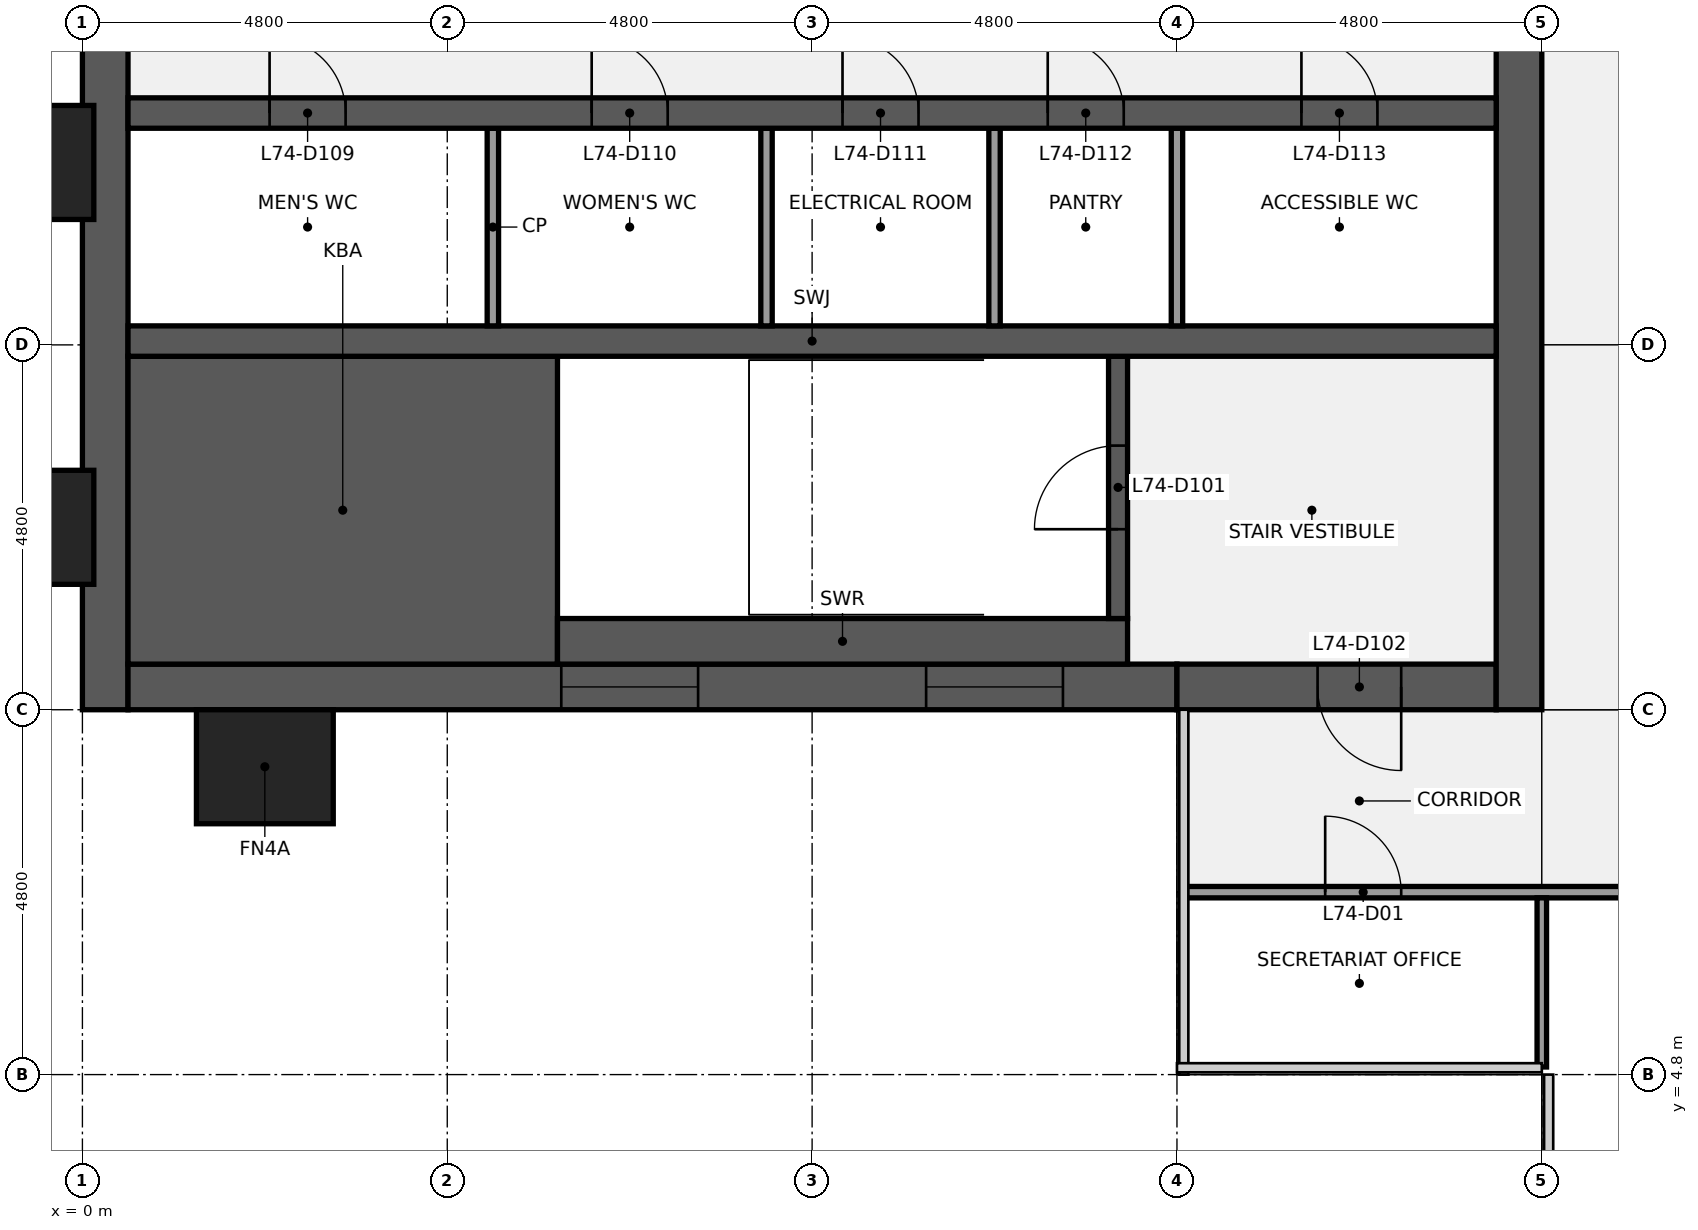
"""IFC4 building model, lengths in metres.
Left out: names, types, materials, properties, quantities, classifications, styles, units other than length and angle.
Written with IfcOpenShell. Run it as: python <this file> out.ifc"""

import sys

from ifc_helpers import new_model, si_unit, direction, frame, frame_2d, origin, origin_2d, place, context, subcontext, project, spatial, rectangle, extrude, element, fill, save


model = new_model("IFC4")
c1 = context("Model", 3, precision=1e-05, world=origin(), true_north=direction((0.0, 1.0)))
c2 = subcontext(c1, "Body", "Model", "MODEL_VIEW")
j1 = project(units=[si_unit("LENGTHUNIT", "METRE"), si_unit("PLANEANGLEUNIT", "RADIAN")], contexts=[c1])
p1 = place(None, origin())
s1 = spatial("IfcSite", under=j1, at=p1, CompositionType="ELEMENT")
p2 = place(p1, origin())
s2 = spatial("IfcBuilding", under=s1, at=p2, CompositionType="ELEMENT")
p3 = place(p2, frame((0.0, 0.0, 334.3)))
s3 = spatial("IfcBuildingStorey", under=s2, at=p3, CompositionType="ELEMENT", Elevation=334.3)
p4 = place(p3, frame((0.3, 9.6, 0.0), z_axis=(0.0, 0.0, 1.0), x_axis=(0.0, 1.0, 0.0)))
e1 = element("IfcWall", 1, at=p4, inside=s3, PredefinedType="SHEAR", context=c2, shape_type="SweptSolid", body=[
    extrude(rectangle(XDim=28.8, YDim=0.6, at=frame_2d((14.4, 0.0))), origin(), (0.0, 0.0, 1.0), 3.84),
])
p5 = place(p4, frame((8.85, 0.0, 0.9)))
e2 = element("IfcOpeningElement", 2, at=p5, cuts=e1, PredefinedType="OPENING", context=c2, shape_type="SweptSolid", body=[
    extrude(rectangle(XDim=1.5, YDim=1.5, at=frame_2d((0.75, 0.75))), frame((0.0, 0.31, 0.0), z_axis=(0.0, -1.0, 0.0), x_axis=(1.0, 0.0, 0.0)), (0.0, 0.0, 1.0), 0.62),
])
p6 = place(p4, frame((18.45, 0.0, 0.9)))
e3 = element("IfcOpeningElement", 3, at=p6, cuts=e1, PredefinedType="OPENING", context=c2, shape_type="SweptSolid", body=[
    extrude(rectangle(XDim=1.5, YDim=1.5, at=frame_2d((0.75, 0.75))), frame((0.0, 0.31, 0.0), z_axis=(0.0, -1.0, 0.0), x_axis=(1.0, 0.0, 0.0)), (0.0, 0.0, 1.0), 0.62),
])
p7 = place(p3, frame((14.4, 9.9, 0.0), z_axis=(0.0, 0.0, 1.0), x_axis=(-1.0, 0.0, 0.0)))
e4 = element("IfcWall", 4, at=p7, inside=s3, PredefinedType="SHEAR", context=c2, shape_type="SweptSolid", body=[
    extrude(rectangle(XDim=13.8, YDim=0.6, at=frame_2d((6.9, 0.0))), origin(), (0.0, 0.0, 1.0), 3.84),
])
p8 = place(p7, frame((6.3, 0.0, 0.9)))
e5 = element("IfcOpeningElement", 5, at=p8, cuts=e4, PredefinedType="OPENING", context=c2, shape_type="SweptSolid", body=[
    extrude(rectangle(XDim=1.8, YDim=1.5, at=frame_2d((0.9, 0.75))), frame((0.0, 0.31, 0.0), z_axis=(0.0, -1.0, 0.0), x_axis=(1.0, 0.0, 0.0)), (0.0, 0.0, 1.0), 0.62),
])
p9 = place(p7, frame((1.5, 0.0, 0.9)))
e6 = element("IfcOpeningElement", 6, at=p9, cuts=e4, PredefinedType="OPENING", context=c2, shape_type="SweptSolid", body=[
    extrude(rectangle(XDim=1.8, YDim=1.5, at=frame_2d((0.9, 0.75))), frame((0.0, 0.31, 0.0), z_axis=(0.0, -1.0, 0.0), x_axis=(1.0, 0.0, 0.0)), (0.0, 0.0, 1.0), 0.62),
])
p10 = place(p3, frame((18.6, 9.9, 0.0), z_axis=(0.0, 0.0, 1.0), x_axis=(-1.0, 0.0, 0.0)))
e7 = element("IfcWall", 7, at=p10, inside=s3, PredefinedType="SHEAR", context=c2, shape_type="SweptSolid", body=[
    extrude(rectangle(XDim=4.2, YDim=0.6, at=frame_2d((2.1, 0.0))), origin(), (0.0, 0.0, 1.0), 3.84),
])
p11 = place(p10, frame((1.25, 0.0, 0.0)))
e8 = element("IfcOpeningElement", 8, at=p11, cuts=e7, PredefinedType="OPENING", context=c2, shape_type="SweptSolid", body=[
    extrude(rectangle(XDim=1.1, YDim=2.1, at=frame_2d((0.55, 1.05))), frame((0.0, 0.31, 0.0), z_axis=(0.0, -1.0, 0.0), x_axis=(1.0, 0.0, 0.0)), (0.0, 0.0, 1.0), 0.62),
])
p12 = place(p3, frame((18.9, 38.4, 0.0), z_axis=(0.0, 0.0, 1.0), x_axis=(0.0, -1.0, 0.0)))
e9 = element("IfcWall", 9, at=p12, inside=s3, PredefinedType="SHEAR", context=c2, shape_type="SweptSolid", body=[
    extrude(rectangle(XDim=28.8, YDim=0.6, at=frame_2d((14.4, 0.0))), origin(), (0.0, 0.0, 1.0), 3.84),
])
p13 = place(p12, frame((18.3, 0.0, 0.0)))
e10 = element("IfcOpeningElement", 10, at=p13, cuts=e9, PredefinedType="OPENING", context=c2, shape_type="SweptSolid", body=[
    extrude(rectangle(XDim=1.8, YDim=2.1, at=frame_2d((0.9, 1.05))), frame((0.0, 0.31, 0.0), z_axis=(0.0, -1.0, 0.0), x_axis=(1.0, 0.0, 0.0)), (0.0, 0.0, 1.0), 0.62),
])
p14 = place(p12, frame((8.7, 0.0, 0.0)))
e11 = element("IfcOpeningElement", 11, at=p14, cuts=e9, PredefinedType="OPENING", context=c2, shape_type="SweptSolid", body=[
    extrude(rectangle(XDim=1.8, YDim=2.1, at=frame_2d((0.9, 1.05))), frame((0.0, 0.31, 0.0), z_axis=(0.0, -1.0, 0.0), x_axis=(1.0, 0.0, 0.0)), (0.0, 0.0, 1.0), 0.62),
])
p15 = place(p3, frame((0.6, 12.225, 0.0), z_axis=(0.0, 0.0, 1.0), x_axis=(1.0, 0.0, 0.0)))
e12 = element("IfcWall", 12, at=p15, inside=s3, PredefinedType="SHEAR", context=c2, shape_type="SweptSolid", body=[
    extrude(rectangle(XDim=5.65, YDim=4.05, at=frame_2d((2.825, 0.0))), origin(), (0.0, 0.0, 1.0), 3.84),
])
p16 = place(p3, frame((6.25, 10.5, 0.0), z_axis=(0.0, 0.0, 1.0), x_axis=(1.0, 0.0, 0.0)))
e13 = element("IfcWall", 13, at=p16, inside=s3, PredefinedType="SHEAR", context=c2, shape_type="SweptSolid", body=[
    extrude(rectangle(XDim=7.5, YDim=0.6, at=frame_2d((3.75, 0.0))), origin(), (0.0, 0.0, 1.0), 3.84),
])
p17 = place(p3, frame((13.625, 10.8, 0.0), z_axis=(0.0, 0.0, 1.0), x_axis=(0.0, 1.0, 0.0)))
e14 = element("IfcWall", 14, at=p17, inside=s3, PredefinedType="SHEAR", context=c2, shape_type="SweptSolid", body=[
    extrude(rectangle(XDim=3.45, YDim=0.25, at=frame_2d((1.725, 0.0))), origin(), (0.0, 0.0, 1.0), 3.84),
])
p18 = place(p17, frame((1.175, 0.0, 0.0)))
e15 = element("IfcOpeningElement", 15, at=p18, cuts=e14, PredefinedType="OPENING", context=c2, shape_type="SweptSolid", body=[
    extrude(rectangle(XDim=1.1, YDim=2.1, at=frame_2d((0.55, 1.05))), frame((0.0, 0.135, 0.0), z_axis=(0.0, -1.0, 0.0), x_axis=(1.0, 0.0, 0.0)), (0.0, 0.0, 1.0), 0.27),
])
p19 = place(p3, frame((0.6, 14.45, 0.0), z_axis=(0.0, 0.0, 1.0), x_axis=(1.0, 0.0, 0.0)))
e16 = element("IfcWall", 16, at=p19, inside=s3, PredefinedType="SHEAR", context=c2, shape_type="SweptSolid", body=[
    extrude(rectangle(XDim=18.0, YDim=0.4, at=frame_2d((9.0, 0.0))), origin(), (0.0, 0.0, 1.0), 3.84),
])
for number, where, z_axis, x_axis in (
    (17, (5.4, 14.65, 0.0), (0.0, 0.0, 1.0), (0.0, 1.0, 0.0)),
    (18, (9.0, 14.65, 0.0), (0.0, 0.0, 1.0), (0.0, 1.0, 0.0)),
    (19, (12.0, 14.65, 0.0), (0.0, 0.0, 1.0), (0.0, 1.0, 0.0)),
    (20, (14.4, 14.65, 0.0), (0.0, 0.0, 1.0), (0.0, 1.0, 0.0)),
):
    element("IfcWall", number, at=place(p3, frame(where, z_axis=z_axis, x_axis=x_axis)), inside=s3, PredefinedType="PARTITIONING", context=c2, shape_type="SweptSolid", body=[
        extrude(rectangle(XDim=2.6, YDim=0.15, at=frame_2d((1.3, 0.0))), origin(), (0.0, 0.0, 1.0), 3.84),
    ])
p20 = place(p3, frame((0.6, 17.45, 0.0), z_axis=(0.0, 0.0, 1.0), x_axis=(1.0, 0.0, 0.0)))
e21 = element("IfcWall", 21, at=p20, inside=s3, PredefinedType="SHEAR", context=c2, shape_type="SweptSolid", body=[
    extrude(rectangle(XDim=18.0, YDim=0.4, at=frame_2d((9.0, 0.0))), origin(), (0.0, 0.0, 1.0), 3.84),
])
p21 = place(p20, frame((1.863, 0.0, 0.0)))
e22 = element("IfcOpeningElement", 22, at=p21, cuts=e21, PredefinedType="OPENING", context=c2, shape_type="SweptSolid", body=[
    extrude(rectangle(XDim=1.0, YDim=2.1, at=frame_2d((0.5, 1.05))), frame((0.0, 0.21, 0.0), z_axis=(0.0, -1.0, 0.0), x_axis=(1.0, 0.0, 0.0)), (0.0, 0.0, 1.0), 0.42),
])
p22 = place(p20, frame((6.1, 0.0, 0.0)))
e23 = element("IfcOpeningElement", 23, at=p22, cuts=e21, PredefinedType="OPENING", context=c2, shape_type="SweptSolid", body=[
    extrude(rectangle(XDim=1.0, YDim=2.1, at=frame_2d((0.5, 1.05))), frame((0.0, 0.21, 0.0), z_axis=(0.0, -1.0, 0.0), x_axis=(1.0, 0.0, 0.0)), (0.0, 0.0, 1.0), 0.42),
])
p23 = place(p20, frame((9.4, 0.0, 0.0)))
e24 = element("IfcOpeningElement", 24, at=p23, cuts=e21, PredefinedType="OPENING", context=c2, shape_type="SweptSolid", body=[
    extrude(rectangle(XDim=1.0, YDim=2.1, at=frame_2d((0.5, 1.05))), frame((0.0, 0.21, 0.0), z_axis=(0.0, -1.0, 0.0), x_axis=(1.0, 0.0, 0.0)), (0.0, 0.0, 1.0), 0.42),
])
p24 = place(p20, frame((12.1, 0.0, 0.0)))
e25 = element("IfcOpeningElement", 25, at=p24, cuts=e21, PredefinedType="OPENING", context=c2, shape_type="SweptSolid", body=[
    extrude(rectangle(XDim=1.0, YDim=2.1, at=frame_2d((0.5, 1.05))), frame((0.0, 0.21, 0.0), z_axis=(0.0, -1.0, 0.0), x_axis=(1.0, 0.0, 0.0)), (0.0, 0.0, 1.0), 0.42),
])
p25 = place(p20, frame((15.438, 0.0, 0.0)))
e26 = element("IfcOpeningElement", 26, at=p25, cuts=e21, PredefinedType="OPENING", context=c2, shape_type="SweptSolid", body=[
    extrude(rectangle(XDim=1.0, YDim=2.1, at=frame_2d((0.5, 1.05))), frame((0.0, 0.21, 0.0), z_axis=(0.0, -1.0, 0.0), x_axis=(1.0, 0.0, 0.0)), (0.0, 0.0, 1.0), 0.42),
])
p26 = place(p3, frame((14.5, 7.2, 0.0), z_axis=(0.0, 0.0, 1.0), x_axis=(1.0, 0.0, 0.0)))
e27 = element("IfcWall", 27, at=p26, inside=s3, PredefinedType="PARTITIONING", context=c2, shape_type="SweptSolid", body=[
    extrude(rectangle(XDim=28.6, YDim=0.15, at=frame_2d((14.3, 0.0))), origin(), (0.0, 0.0, 1.0), 2.849),
])
p27 = place(p26, frame((1.85, 0.0, 0.0)))
e28 = element("IfcOpeningElement", 28, at=p27, cuts=e27, PredefinedType="OPENING", context=c2, shape_type="SweptSolid", body=[
    extrude(rectangle(XDim=1.0, YDim=2.1, at=frame_2d((0.5, 1.05))), frame((0.0, 0.085, 0.0), z_axis=(0.0, -1.0, 0.0), x_axis=(1.0, 0.0, 0.0)), (0.0, 0.0, 1.0), 0.17),
])
p28 = place(p26, frame((6.6, 0.0, 0.0)))
e29 = element("IfcOpeningElement", 29, at=p28, cuts=e27, PredefinedType="OPENING", context=c2, shape_type="SweptSolid", body=[
    extrude(rectangle(XDim=1.0, YDim=2.1, at=frame_2d((0.5, 1.05))), frame((0.0, 0.085, 0.0), z_axis=(0.0, -1.0, 0.0), x_axis=(1.0, 0.0, 0.0)), (0.0, 0.0, 1.0), 0.17),
])
p29 = place(p26, frame((13.8, 0.0, 0.0)))
e30 = element("IfcOpeningElement", 30, at=p29, cuts=e27, PredefinedType="OPENING", context=c2, shape_type="SweptSolid", body=[
    extrude(rectangle(XDim=1.0, YDim=2.1, at=frame_2d((0.5, 1.05))), frame((0.0, 0.085, 0.0), z_axis=(0.0, -1.0, 0.0), x_axis=(1.0, 0.0, 0.0)), (0.0, 0.0, 1.0), 0.17),
])
p30 = place(p26, frame((21.0, 0.0, 0.0)))
e31 = element("IfcOpeningElement", 31, at=p30, cuts=e27, PredefinedType="OPENING", context=c2, shape_type="SweptSolid", body=[
    extrude(rectangle(XDim=1.0, YDim=2.1, at=frame_2d((0.5, 1.05))), frame((0.0, 0.085, 0.0), z_axis=(0.0, -1.0, 0.0), x_axis=(1.0, 0.0, 0.0)), (0.0, 0.0, 1.0), 0.17),
])
p31 = place(p26, frame((25.75, 0.0, 0.0)))
e32 = element("IfcOpeningElement", 32, at=p31, cuts=e27, PredefinedType="OPENING", context=c2, shape_type="SweptSolid", body=[
    extrude(rectangle(XDim=1.0, YDim=2.1, at=frame_2d((0.5, 1.05))), frame((0.0, 0.085, 0.0), z_axis=(0.0, -1.0, 0.0), x_axis=(1.0, 0.0, 0.0)), (0.0, 0.0, 1.0), 0.17),
])
p32 = place(p3, frame((19.2, 4.9, 0.0), z_axis=(0.0, 0.0, 1.0), x_axis=(0.0, 1.0, 0.0)))
e33 = element("IfcWall", 33, at=p32, inside=s3, PredefinedType="PARTITIONING", context=c2, shape_type="SweptSolid", body=[
    extrude(rectangle(XDim=2.225, YDim=0.125, at=frame_2d((1.113, 0.0))), origin(), (0.0, 0.0, 1.0), 2.849),
])
for number, where, z_axis, x_axis in (
    (34, (-0.75, 12.0, 0.0), (0.0, 0.0, 1.0), (0.0, 1.0, 0.0)),
    (35, (-0.75, 16.8, 0.0), (0.0, 0.0, 1.0), (0.0, 1.0, 0.0)),
    (36, (2.4, 8.85, 0.0), (0.0, 0.0, 1.0), (1.0, 0.0, 0.0)),
):
    element("IfcColumn", number, at=place(p3, frame(where, z_axis=z_axis, x_axis=x_axis)), inside=s3, PredefinedType="PILASTER", context=c2, shape_type="SweptSolid", body=[
        extrude(rectangle(XDim=1.8, YDim=1.5, at=origin_2d()), origin(), (0.0, 0.0, 1.0), 4.0),
    ])
p33 = place(p18, origin())
e37 = element("IfcDoor", 37, at=p33, inside=s3, OperationType="SINGLE_SWING_LEFT", PredefinedType="DOOR", context=c2, shape_type="SweptSolid", body=[
    extrude(rectangle(XDim=1.1, YDim=2.1, at=frame_2d((0.55, 1.05))), frame((0.0, 0.025, 0.0), z_axis=(0.0, -1.0, 0.0), x_axis=(1.0, 0.0, 0.0)), (0.0, 0.0, 1.0), 0.05),
])
fill(e15, e37)
p34 = place(p11, origin())
e38 = element("IfcDoor", 38, at=p34, inside=s3, OperationType="SINGLE_SWING_LEFT", PredefinedType="DOOR", context=c2, shape_type="SweptSolid", body=[
    extrude(rectangle(XDim=1.1, YDim=2.1, at=frame_2d((0.55, 1.05))), frame((0.0, 0.025, 0.0), z_axis=(0.0, -1.0, 0.0), x_axis=(1.0, 0.0, 0.0)), (0.0, 0.0, 1.0), 0.05),
])
fill(e8, e38)
p35 = place(p21, origin())
e39 = element("IfcDoor", 39, at=p35, inside=s3, OperationType="SINGLE_SWING_LEFT", PredefinedType="DOOR", context=c2, shape_type="SweptSolid", body=[
    extrude(rectangle(XDim=1.0, YDim=2.1, at=frame_2d((0.5, 1.05))), frame((0.0, 0.025, 0.0), z_axis=(0.0, -1.0, 0.0), x_axis=(1.0, 0.0, 0.0)), (0.0, 0.0, 1.0), 0.05),
])
fill(e22, e39)
p36 = place(p22, origin())
e40 = element("IfcDoor", 40, at=p36, inside=s3, OperationType="SINGLE_SWING_LEFT", PredefinedType="DOOR", context=c2, shape_type="SweptSolid", body=[
    extrude(rectangle(XDim=1.0, YDim=2.1, at=frame_2d((0.5, 1.05))), frame((0.0, 0.025, 0.0), z_axis=(0.0, -1.0, 0.0), x_axis=(1.0, 0.0, 0.0)), (0.0, 0.0, 1.0), 0.05),
])
fill(e23, e40)
p37 = place(p23, origin())
e41 = element("IfcDoor", 41, at=p37, inside=s3, OperationType="SINGLE_SWING_LEFT", PredefinedType="DOOR", context=c2, shape_type="SweptSolid", body=[
    extrude(rectangle(XDim=1.0, YDim=2.1, at=frame_2d((0.5, 1.05))), frame((0.0, 0.025, 0.0), z_axis=(0.0, -1.0, 0.0), x_axis=(1.0, 0.0, 0.0)), (0.0, 0.0, 1.0), 0.05),
])
fill(e24, e41)
p38 = place(p24, origin())
e42 = element("IfcDoor", 42, at=p38, inside=s3, OperationType="SINGLE_SWING_LEFT", PredefinedType="DOOR", context=c2, shape_type="SweptSolid", body=[
    extrude(rectangle(XDim=1.0, YDim=2.1, at=frame_2d((0.5, 1.05))), frame((0.0, 0.025, 0.0), z_axis=(0.0, -1.0, 0.0), x_axis=(1.0, 0.0, 0.0)), (0.0, 0.0, 1.0), 0.05),
])
fill(e25, e42)
p39 = place(p25, origin())
e43 = element("IfcDoor", 43, at=p39, inside=s3, OperationType="SINGLE_SWING_LEFT", PredefinedType="DOOR", context=c2, shape_type="SweptSolid", body=[
    extrude(rectangle(XDim=1.0, YDim=2.1, at=frame_2d((0.5, 1.05))), frame((0.0, 0.025, 0.0), z_axis=(0.0, -1.0, 0.0), x_axis=(1.0, 0.0, 0.0)), (0.0, 0.0, 1.0), 0.05),
])
fill(e26, e43)
p40 = place(p8, origin())
e44 = element("IfcWindow", 44, at=p40, inside=s3, PartitioningType="SINGLE_PANEL", PredefinedType="WINDOW", context=c2, shape_type="SweptSolid", body=[
    extrude(rectangle(XDim=1.8, YDim=1.5, at=frame_2d((0.9, 0.75))), frame((0.0, 0.03, 0.0), z_axis=(0.0, -1.0, 0.0), x_axis=(1.0, 0.0, 0.0)), (0.0, 0.0, 1.0), 0.06),
])
fill(e5, e44)
p41 = place(p9, origin())
e45 = element("IfcWindow", 45, at=p41, inside=s3, PartitioningType="SINGLE_PANEL", PredefinedType="WINDOW", context=c2, shape_type="SweptSolid", body=[
    extrude(rectangle(XDim=1.8, YDim=1.5, at=frame_2d((0.9, 0.75))), frame((0.0, 0.03, 0.0), z_axis=(0.0, -1.0, 0.0), x_axis=(1.0, 0.0, 0.0)), (0.0, 0.0, 1.0), 0.06),
])
fill(e6, e45)
p42 = place(p27, origin())
e46 = element("IfcDoor", 46, at=p42, inside=s3, OperationType="SINGLE_SWING_LEFT", PredefinedType="DOOR", context=c2, shape_type="SweptSolid", body=[
    extrude(rectangle(XDim=1.0, YDim=2.1, at=frame_2d((0.5, 1.05))), frame((0.0, 0.025, 0.0), z_axis=(0.0, -1.0, 0.0), x_axis=(1.0, 0.0, 0.0)), (0.0, 0.0, 1.0), 0.05),
])
fill(e28, e46)
save(model, sys.argv[1])
